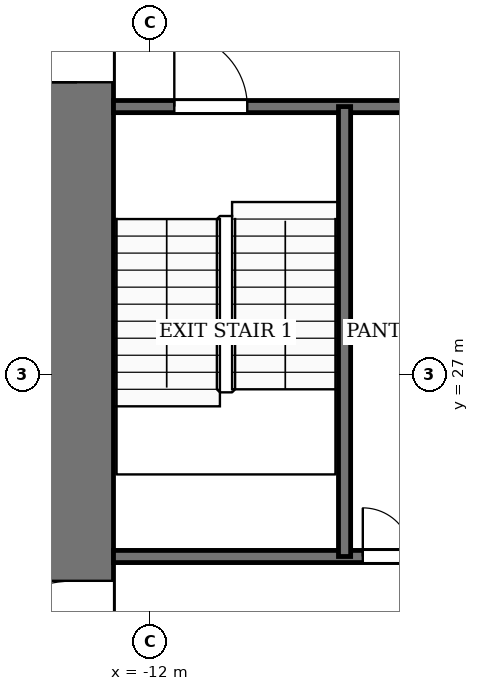
"""IFC4 building model, lengths in metres.
Left out: names, types, materials, properties, quantities, classifications, styles, units other than length and angle.
Written with IfcOpenShell. Run it as: python <this file> out.ifc"""

import sys

from ifc_helpers import new_model, si_unit, direction, frame, frame_2d, origin, place, context, subcontext, project, spatial, rectangle, extrude, element, fill, save


model = new_model("IFC4")
c1 = context("Model", 3, precision=1e-05, world=origin(), true_north=direction((0.0, 1.0)))
c2 = subcontext(c1, "Body", "Model", "MODEL_VIEW")
j1 = project(units=[si_unit("LENGTHUNIT", "METRE"), si_unit("PLANEANGLEUNIT", "RADIAN")], contexts=[c1])
p1 = place(None, origin())
s1 = spatial("IfcSite", under=j1, at=p1, CompositionType="ELEMENT")
p2 = place(p1, origin())
s2 = spatial("IfcBuilding", under=s1, at=p2, CompositionType="ELEMENT")
p3 = place(p2, frame((0.0, 0.0, 78.0)))
s3 = spatial("IfcBuildingStorey", under=s2, at=p3, CompositionType="ELEMENT", Elevation=78.0)
p4 = place(p3, frame((-13.2, 18.4, -0.13), z_axis=(0.0, 0.0, 1.0), x_axis=(0.0, 1.0, 0.0)))
e1 = element("IfcWall", 1, at=p4, inside=s3, PredefinedType="SHEAR", context=c2, shape_type="SweptSolid", body=[
    extrude(rectangle(XDim=19.2, YDim=1.2, at=frame_2d((9.6, 0.0))), origin(), (0.0, 0.0, 1.0), 4.0),
])
p5 = place(p4, frame((2.8, 0.0, 0.13)))
e2 = element("IfcOpeningElement", 2, at=p5, cuts=e1, PredefinedType="OPENING", context=c2, shape_type="SweptSolid", body=[
    extrude(rectangle(XDim=2.4, YDim=2.4, at=frame_2d((1.2, 1.2))), frame((0.0, 0.61, 0.0), z_axis=(0.0, -1.0, 0.0), x_axis=(1.0, 0.0, 0.0)), (0.0, 0.0, 1.0), 1.22),
])
p6 = place(p4, frame((13.4, 0.0, 0.13)))
e3 = element("IfcOpeningElement", 3, at=p6, cuts=e1, PredefinedType="OPENING", context=c2, shape_type="SweptSolid", body=[
    extrude(rectangle(XDim=1.4, YDim=2.2, at=frame_2d((0.7, 1.1))), frame((0.0, 0.61, 0.0), z_axis=(0.0, -1.0, 0.0), x_axis=(1.0, 0.0, 0.0)), (0.0, 0.0, 1.0), 1.22),
])
p7 = place(p3, frame((-12.6, 24.0, 0.0), z_axis=(0.0, 0.0, 1.0), x_axis=(1.0, 0.0, 0.0)))
e4 = element("IfcWall", 4, at=p7, inside=s3, PredefinedType="PARTITIONING", context=c2, shape_type="SweptSolid", body=[
    extrude(rectangle(XDim=6.6, YDim=0.2, at=frame_2d((3.3, 0.0))), origin(), (0.0, 0.0, 1.0), 3.87),
])
p8 = place(p7, frame((4.1, 0.0, 0.0)))
e5 = element("IfcOpeningElement", 5, at=p8, cuts=e4, PredefinedType="OPENING", context=c2, shape_type="SweptSolid", body=[
    extrude(rectangle(XDim=0.8, YDim=2.1, at=frame_2d((0.4, 1.05))), frame((0.0, 0.11, 0.0), z_axis=(0.0, -1.0, 0.0), x_axis=(1.0, 0.0, 0.0)), (0.0, 0.0, 1.0), 0.22),
])
p9 = place(p7, frame((5.5, 0.0, 0.0)))
e6 = element("IfcOpeningElement", 6, at=p9, cuts=e4, PredefinedType="OPENING", context=c2, shape_type="SweptSolid", body=[
    extrude(rectangle(XDim=0.8, YDim=2.1, at=frame_2d((0.4, 1.05))), frame((0.0, 0.11, 0.0), z_axis=(0.0, -1.0, 0.0), x_axis=(1.0, 0.0, 0.0)), (0.0, 0.0, 1.0), 0.22),
])
p10 = place(p3, frame((-12.6, 31.4, 0.0), z_axis=(0.0, 0.0, 1.0), x_axis=(1.0, 0.0, 0.0)))
e7 = element("IfcWall", 7, at=p10, inside=s3, PredefinedType="PARTITIONING", context=c2, shape_type="SweptSolid", body=[
    extrude(rectangle(XDim=6.6, YDim=0.2, at=frame_2d((3.3, 0.0))), origin(), (0.0, 0.0, 1.0), 3.87),
])
p11 = place(p10, frame((1.0, 0.0, 0.0)))
e8 = element("IfcOpeningElement", 8, at=p11, cuts=e7, PredefinedType="OPENING", context=c2, shape_type="SweptSolid", body=[
    extrude(rectangle(XDim=1.2, YDim=2.2, at=frame_2d((0.6, 1.1))), frame((0.0, 0.11, 0.0), z_axis=(0.0, -1.0, 0.0), x_axis=(1.0, 0.0, 0.0)), (0.0, 0.0, 1.0), 0.22),
])
p12 = place(p3, frame((-8.8, 24.0, 0.0), z_axis=(0.0, 0.0, 1.0), x_axis=(0.0, 1.0, 0.0)))
e9 = element("IfcWall", 9, at=p12, inside=s3, PredefinedType="PARTITIONING", context=c2, shape_type="SweptSolid", body=[
    extrude(rectangle(XDim=7.4, YDim=0.2, at=frame_2d((3.7, 0.0))), origin(), (0.0, 0.0, 1.0), 3.87),
])
p13 = place(p8, origin())
e10 = element("IfcDoor", 10, at=p13, inside=s3, OperationType="SINGLE_SWING_RIGHT", PredefinedType="DOOR", context=c2, shape_type="SweptSolid", body=[
    extrude(rectangle(XDim=0.8, YDim=2.1, at=frame_2d((0.4, 1.05))), frame((0.0, 0.025, 0.0), z_axis=(0.0, -1.0, 0.0), x_axis=(1.0, 0.0, 0.0)), (0.0, 0.0, 1.0), 0.05),
])
fill(e5, e10)
p14 = place(p11, origin())
e11 = element("IfcDoor", 11, at=p14, inside=s3, OperationType="SINGLE_SWING_RIGHT", PredefinedType="DOOR", context=c2, shape_type="SweptSolid", body=[
    extrude(rectangle(XDim=1.2, YDim=2.2, at=frame_2d((0.6, 1.1))), frame((0.0, 0.025, 0.0), z_axis=(0.0, -1.0, 0.0), x_axis=(1.0, 0.0, 0.0)), (0.0, 0.0, 1.0), 0.05),
])
fill(e8, e11)
p15 = place(p5, origin())
e12 = element("IfcDoor", 12, at=p15, inside=s3, OperationType="DOUBLE_DOOR_SINGLE_SWING", PredefinedType="DOOR", context=c2, shape_type="SweptSolid", body=[
    extrude(rectangle(XDim=2.4, YDim=2.4, at=frame_2d((1.2, 1.2))), frame((0.0, 0.025, 0.0), z_axis=(0.0, -1.0, 0.0), x_axis=(1.0, 0.0, 0.0)), (0.0, 0.0, 1.0), 0.05),
])
fill(e2, e12)
p16 = place(p6, origin())
e13 = element("IfcDoor", 13, at=p16, inside=s3, OperationType="SINGLE_SWING_RIGHT", PredefinedType="DOOR", context=c2, shape_type="SweptSolid", body=[
    extrude(rectangle(XDim=1.4, YDim=2.2, at=frame_2d((0.7, 1.1))), frame((0.0, 0.025, 0.0), z_axis=(0.0, -1.0, 0.0), x_axis=(1.0, 0.0, 0.0)), (0.0, 0.0, 1.0), 0.05),
])
fill(e3, e13)
save(model, sys.argv[1])
